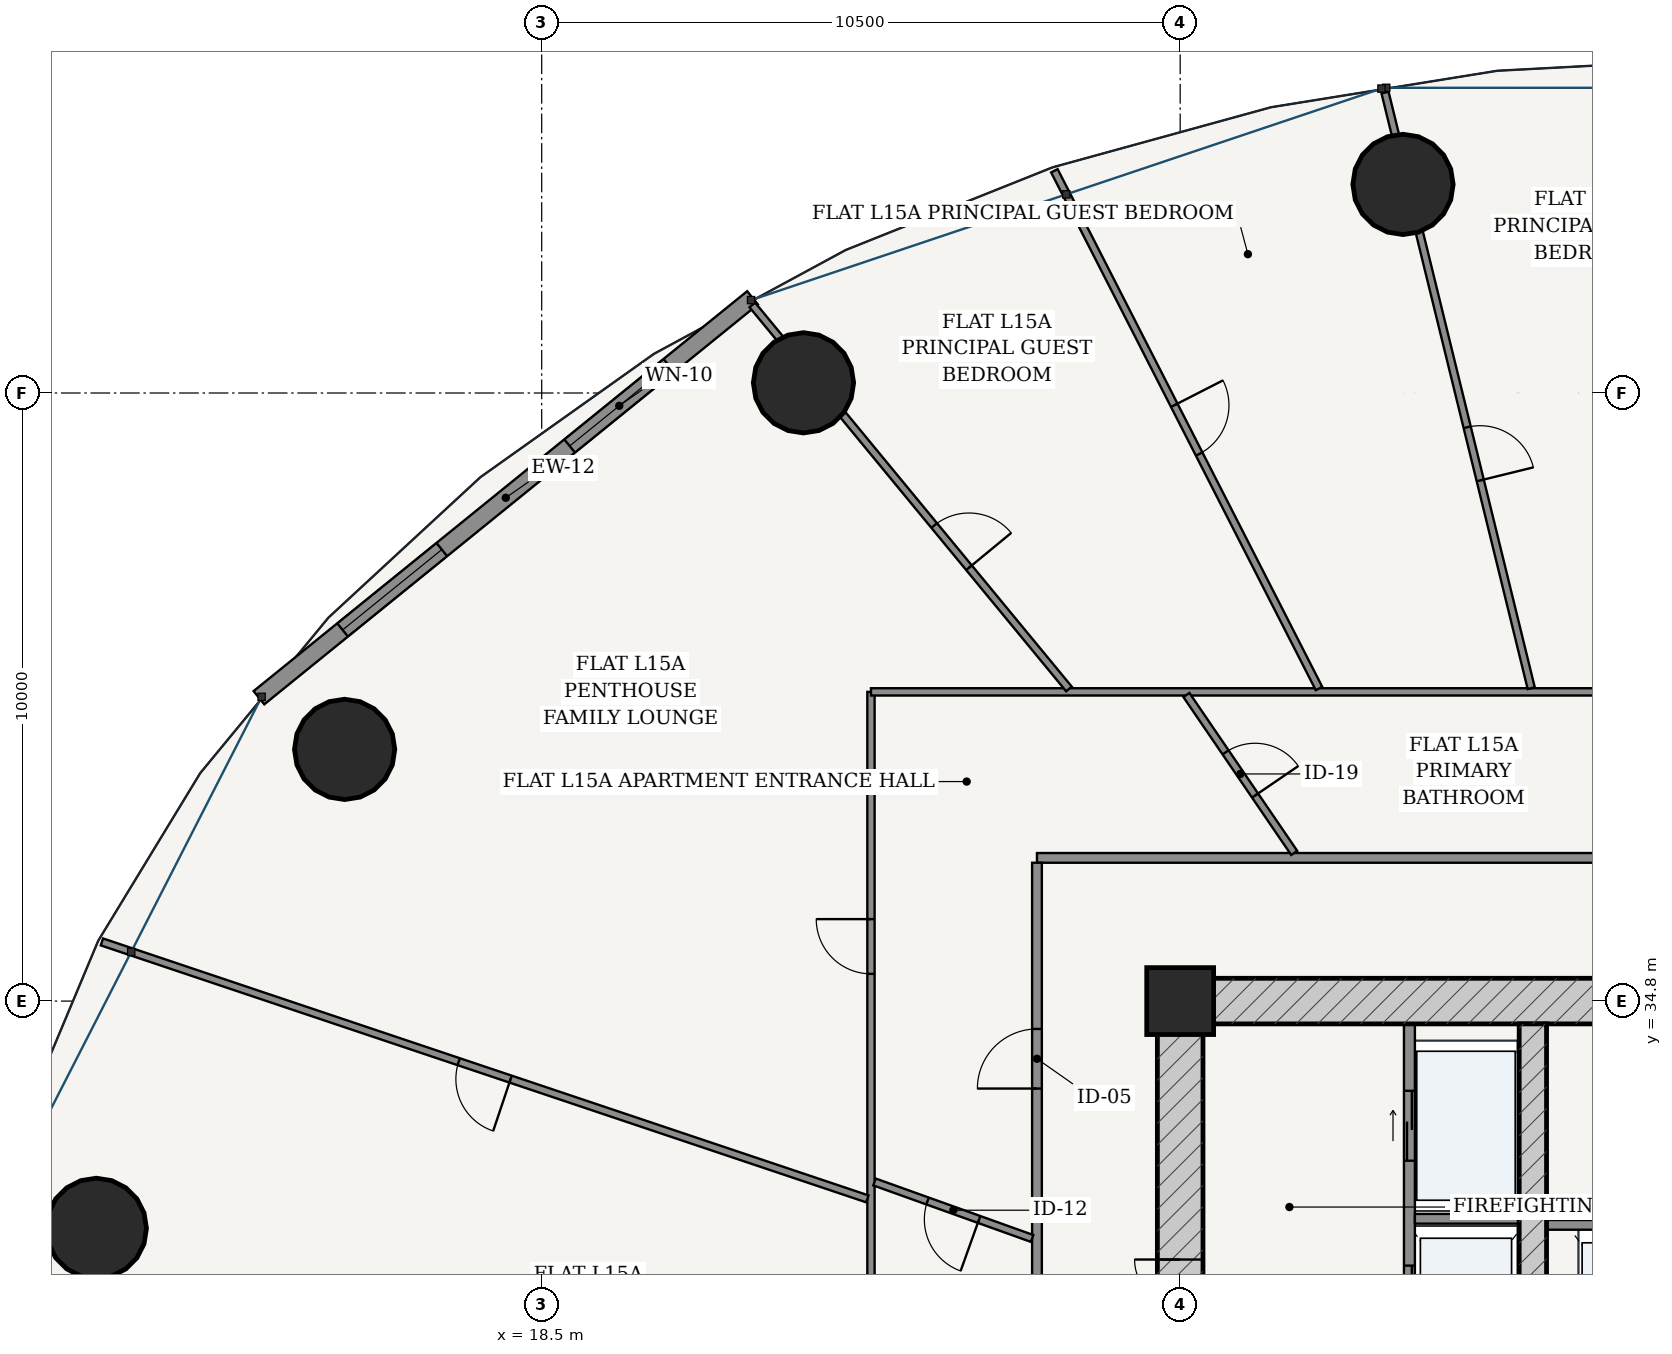
"""IFC4 building model, lengths in metres.
Left out: names, types, materials, properties, quantities, classifications, styles, units other than length and angle.
Written with IfcOpenShell. Run it as: python <this file> out.ifc"""

import sys

from ifc_helpers import new_model, si_unit, direction, frame, frame_2d, origin, origin_2d, place, context, subcontext, project, spatial, rectangle, hollow_circle, extrude, source, transform, mapped, element, fill, save


model = new_model("IFC4")
c1 = context("Model", 3, precision=1e-05, world=origin(), true_north=direction((-0.2419218956, 0.970295726276)))
c2 = subcontext(c1, "Body", "Model", "MODEL_VIEW")
j1 = project(units=[si_unit("LENGTHUNIT", "METRE"), si_unit("PLANEANGLEUNIT", "RADIAN")], contexts=[c1])
p1 = place(None, origin())
s1 = spatial("IfcSite", under=j1, at=p1, CompositionType="ELEMENT")
p2 = place(p1, origin())
s2 = spatial("IfcBuilding", under=s1, at=p2, CompositionType="ELEMENT")
p3 = place(p2, frame((0.0, 0.0, 60.0)))
s3 = spatial("IfcBuildingStorey", under=s2, at=p3, CompositionType="ELEMENT", Elevation=60.0)
p4 = place(p3, frame((29.0, 34.8, 0.0), z_axis=(0.0, 0.0, 1.0), x_axis=(1.0, 0.0, 0.0)))
e1 = element("IfcColumn", 1, at=p4, inside=s3, PredefinedType="COLUMN", context=c2, shape_type="SweptSolid", body=[
    extrude(rectangle(XDim=1.1, YDim=1.1, at=origin_2d()), origin(), (0.0, 0.0, 1.0), 3.6),
])
p5 = place(p3, frame((28.625, 34.8, 0.0), z_axis=(0.0, 0.0, 1.0), x_axis=(1.0, 0.0, 0.0)))
e2 = element("IfcWall", 2, at=p5, inside=s3, PredefinedType="SHEAR", context=c2, shape_type="SweptSolid", body=[
    extrude(rectangle(XDim=18.75, YDim=0.75, at=frame_2d((9.375, 0.0))), origin(), (0.0, 0.0, 1.0), 3.32),
])
p6 = place(p5, frame((8.95, 0.0, 0.0)))
e3 = element("IfcOpeningElement", 3, at=p6, cuts=e2, PredefinedType="OPENING", context=c2, shape_type="SweptSolid", body=[
    extrude(rectangle(XDim=0.85, YDim=2.1, at=frame_2d((0.425, 1.05))), frame((0.0, 0.385, 0.0), z_axis=(0.0, -1.0, 0.0), x_axis=(1.0, 0.0, 0.0)), (0.0, 0.0, 1.0), 0.77),
])
p7 = place(p3, frame((29.0, 19.175, 0.0), z_axis=(0.0, 0.0, 1.0), x_axis=(0.0, 1.0, 0.0)))
e4 = element("IfcWall", 4, at=p7, inside=s3, PredefinedType="SHEAR", context=c2, shape_type="SweptSolid", body=[
    extrude(rectangle(XDim=15.25, YDim=0.75, at=frame_2d((7.625, 0.0))), origin(), (0.0, 0.0, 1.0), 3.32),
])
p8 = place(p7, frame((9.875, 0.0, 0.0)))
e5 = element("IfcOpeningElement", 5, at=p8, cuts=e4, PredefinedType="OPENING", context=c2, shape_type="SweptSolid", body=[
    extrude(rectangle(XDim=1.5, YDim=2.2, at=frame_2d((0.75, 1.1))), frame((0.0, 0.385, 0.0), z_axis=(0.0, -1.0, 0.0), x_axis=(1.0, 0.0, 0.0)), (0.0, 0.0, 1.0), 0.77),
])
p9 = place(p3, frame((34.8, 19.175, 0.0), z_axis=(0.0, 0.0, 1.0), x_axis=(0.0, 1.0, 0.0)))
e6 = element("IfcWall", 6, at=p9, inside=s3, PredefinedType="SHEAR", context=c2, shape_type="SweptSolid", body=[
    extrude(rectangle(XDim=15.25, YDim=0.45, at=frame_2d((7.625, 0.0))), origin(), (0.0, 0.0, 1.0), 3.32),
])
p10 = place(p9, frame((7.8, 0.0, 0.0)))
e7 = element("IfcOpeningElement", 7, at=p10, cuts=e6, PredefinedType="OPENING", context=c2, shape_type="SweptSolid", body=[
    extrude(rectangle(XDim=1.05, YDim=2.15, at=frame_2d((0.525, 1.075))), frame((0.0, 0.235, 0.0), z_axis=(0.0, -1.0, 0.0), x_axis=(1.0, 0.0, 0.0)), (0.0, 0.0, 1.0), 0.47),
])
for number, where, z_axis, x_axis in (
    (8, (32.664, 48.23, 0.0), (0.0, 0.0, 1.0), (1.0, 0.0, 0.0)),
    (9, (22.805, 44.968, 0.0), (0.0, 0.0, 1.0), (1.0, 0.0, 0.0)),
    (10, (15.259, 38.939, 0.0), (0.0, 0.0, 1.0), (1.0, 0.0, 0.0)),
    (11, (11.176, 31.063, 0.0), (0.0, 0.0, 1.0), (1.0, 0.0, 0.0)),
):
    element("IfcColumn", number, at=place(p3, frame(where, z_axis=z_axis, x_axis=x_axis)), inside=s3, PredefinedType="COLUMN", context=c2, shape_type="SweptSolid", body=[
        extrude(hollow_circle(Radius=0.825, WallThickness=0.05, at=origin_2d()), origin(), (0.0, 0.0, 1.0), 3.6),
    ])
p11 = place(p3, frame((21.967, 46.365, 0.0), z_axis=(0.0, 0.0, 1.0), x_axis=(-0.777005352078, -0.62949398952, 0.0)))
e12 = element("IfcWall", 12, at=p11, inside=s3, PredefinedType="SOLIDWALL", context=c2, shape_type="SweptSolid", body=[
    extrude(rectangle(XDim=10.447, YDim=0.28, at=frame_2d((5.223, 0.0))), origin(), (0.0, 0.0, 1.0), 3.32),
])
p12 = place(p11, frame((1.771, 0.0, 0.85)))
e13 = element("IfcOpeningElement", 13, at=p12, cuts=e12, PredefinedType="OPENING", context=c2, shape_type="SweptSolid", body=[
    extrude(rectangle(XDim=2.1, YDim=1.95, at=frame_2d((1.05, 0.975))), frame((0.0, 0.15, 0.0), z_axis=(0.0, -1.0, 0.0), x_axis=(1.0, 0.0, 0.0)), (0.0, 0.0, 1.0), 0.3),
])
p13 = place(p11, frame((6.576, 0.0, 0.85)))
e14 = element("IfcOpeningElement", 14, at=p13, cuts=e12, PredefinedType="OPENING", context=c2, shape_type="SweptSolid", body=[
    extrude(rectangle(XDim=2.1, YDim=1.95, at=frame_2d((1.05, 0.975))), frame((0.0, 0.15, 0.0), z_axis=(0.0, -1.0, 0.0), x_axis=(1.0, 0.0, 0.0)), (0.0, 0.0, 1.0), 0.3),
])
p14 = place(p3, frame((32.77, 28.52, 0.0), z_axis=(0.0, 0.0, 1.0), x_axis=(0.0, 1.0, 0.0)))
e15 = element("IfcWall", 15, at=p14, inside=s3, PredefinedType="PARTITIONING", context=c2, shape_type="SweptSolid", body=[
    extrude(rectangle(XDim=5.905, YDim=0.18, at=frame_2d((2.953, 0.0))), origin(), (0.0, 0.0, 1.0), 3.32),
])
p15 = place(p14, frame((3.655, 0.0, 0.0)))
e16 = element("IfcOpeningElement", 16, at=p15, cuts=e15, PredefinedType="OPENING", context=c2, shape_type="SweptSolid", body=[
    extrude(rectangle(XDim=1.15, YDim=2.2, at=frame_2d((0.575, 1.1))), frame((0.0, 0.1, 0.0), z_axis=(0.0, -1.0, 0.0), x_axis=(1.0, 0.0, 0.0)), (0.0, 0.0, 1.0), 0.2),
])
p16 = place(p14, frame((0.73, 0.0, 0.0)))
e17 = element("IfcOpeningElement", 17, at=p16, cuts=e15, PredefinedType="OPENING", context=c2, shape_type="SweptSolid", body=[
    extrude(rectangle(XDim=1.2, YDim=2.25, at=frame_2d((0.6, 1.125))), frame((0.0, 0.1, 0.0), z_axis=(0.0, -1.0, 0.0), x_axis=(1.0, 0.0, 0.0)), (0.0, 0.0, 1.0), 0.2),
])
p17 = place(p3, frame((32.86, 31.22, 0.0), z_axis=(0.0, 0.0, 1.0), x_axis=(1.0, 0.0, 0.0)))
e18 = element("IfcWall", 18, at=p17, inside=s3, PredefinedType="PARTITIONING", context=c2, shape_type="SweptSolid", body=[
    extrude(rectangle(XDim=1.715, YDim=0.16, at=frame_2d((0.857, 0.0))), origin(), (0.0, 0.0, 1.0), 3.32),
])
p18 = place(p3, frame((35.025, 31.12, 0.0), z_axis=(0.0, 0.0, 1.0), x_axis=(1.0, 0.0, 0.0)))
e19 = element("IfcWall", 19, at=p18, inside=s3, PredefinedType="PARTITIONING", context=c2, shape_type="SweptSolid", body=[
    extrude(rectangle(XDim=5.95, YDim=0.16, at=frame_2d((2.975, 0.0))), origin(), (0.0, 0.0, 1.0), 3.32),
])
p19 = place(p3, frame((26.645, 37.155, 0.0), z_axis=(0.0, 0.0, 1.0), x_axis=(1.0, 0.0, 0.0)))
e20 = element("IfcWall", 20, at=p19, inside=s3, PredefinedType="PARTITIONING", context=c2, shape_type="SweptSolid", body=[
    extrude(rectangle(XDim=22.71, YDim=0.16, at=frame_2d((11.355, 0.0))), origin(), (0.0, 0.0, 1.0), 2.688),
])
p20 = place(p3, frame((26.645, 16.525, 0.0), z_axis=(0.0, 0.0, 1.0), x_axis=(0.0, 1.0, 0.0)))
e21 = element("IfcWall", 21, at=p20, inside=s3, PredefinedType="PARTITIONING", context=c2, shape_type="SweptSolid", body=[
    extrude(rectangle(XDim=20.55, YDim=0.16, at=frame_2d((10.275, 0.0))), origin(), (0.0, 0.0, 1.0), 2.688),
])
p21 = place(p20, frame((16.837, 0.0, 0.0)))
e22 = element("IfcOpeningElement", 22, at=p21, cuts=e21, PredefinedType="OPENING", context=c2, shape_type="SweptSolid", body=[
    extrude(rectangle(XDim=0.98, YDim=2.2, at=frame_2d((0.49, 1.1))), frame((0.0, 0.09, 0.0), z_axis=(0.0, -1.0, 0.0), x_axis=(1.0, 0.0, 0.0)), (0.0, 0.0, 1.0), 0.18),
])
p22 = place(p3, frame((23.915, 19.276, 0.0), z_axis=(0.0, 0.0, 1.0), x_axis=(0.0, 1.0, 0.0)))
e23 = element("IfcWall", 23, at=p22, inside=s3, PredefinedType="PARTITIONING", context=c2, shape_type="SweptSolid", body=[
    extrude(rectangle(XDim=20.609, YDim=0.12, at=frame_2d((10.305, 0.0))), origin(), (0.0, 0.0, 1.0), 2.688),
])
p23 = place(p22, frame((15.972, 0.0, 0.0)))
e24 = element("IfcOpeningElement", 24, at=p23, cuts=e23, PredefinedType="OPENING", context=c2, shape_type="SweptSolid", body=[
    extrude(rectangle(XDim=0.9, YDim=2.15, at=frame_2d((0.45, 1.075))), frame((0.0, 0.07, 0.0), z_axis=(0.0, -1.0, 0.0), x_axis=(1.0, 0.0, 0.0)), (0.0, 0.0, 1.0), 0.14),
])
p24 = place(p22, frame((3.058, 0.0, 0.0)))
e25 = element("IfcOpeningElement", 25, at=p24, cuts=e23, PredefinedType="OPENING", context=c2, shape_type="SweptSolid", body=[
    extrude(rectangle(XDim=0.9, YDim=2.15, at=frame_2d((0.45, 1.075))), frame((0.0, 0.07, 0.0), z_axis=(0.0, -1.0, 0.0), x_axis=(1.0, 0.0, 0.0)), (0.0, 0.0, 1.0), 0.14),
])
p25 = place(p3, frame((23.915, 39.885, 0.0), z_axis=(0.0, 0.0, 1.0), x_axis=(1.0, 0.0, 0.0)))
e26 = element("IfcWall", 26, at=p25, inside=s3, PredefinedType="PARTITIONING", context=c2, shape_type="SweptSolid", body=[
    extrude(rectangle(XDim=28.17, YDim=0.12, at=frame_2d((14.085, 0.0))), origin(), (0.0, 0.0, 1.0), 2.688),
])
p26 = place(p25, frame((12.891, 0.0, 0.0)))
e27 = element("IfcOpeningElement", 27, at=p26, cuts=e26, PredefinedType="OPENING", context=c2, shape_type="SweptSolid", body=[
    extrude(rectangle(XDim=0.9, YDim=2.15, at=frame_2d((0.45, 1.075))), frame((0.0, 0.07, 0.0), z_axis=(0.0, -1.0, 0.0), x_axis=(1.0, 0.0, 0.0)), (0.0, 0.0, 1.0), 0.14),
])
p27 = place(p3, frame((34.773, 39.945, 0.0), z_axis=(0.0, 0.0, 1.0), x_axis=(-0.238375747469, 0.97117300365, 0.0)))
e28 = element("IfcWall", 28, at=p27, inside=s3, PredefinedType="PARTITIONING", context=c2, shape_type="SweptSolid", body=[
    extrude(rectangle(XDim=10.086, YDim=0.12, at=frame_2d((5.043, 0.0))), origin(), (0.0, 0.0, 1.0), 2.688),
])
p28 = place(p27, frame((3.519, 0.0, 0.0)))
e29 = element("IfcOpeningElement", 29, at=p28, cuts=e28, PredefinedType="OPENING", context=c2, shape_type="SweptSolid", body=[
    extrude(rectangle(XDim=0.9, YDim=2.15, at=frame_2d((0.45, 1.075))), frame((0.0, 0.07, 0.0), z_axis=(0.0, -1.0, 0.0), x_axis=(1.0, 0.0, 0.0)), (0.0, 0.0, 1.0), 0.14),
])
p29 = place(p3, frame((31.283, 39.94, 0.0), z_axis=(0.0, 0.0, 1.0), x_axis=(-0.455131303234, 0.890424335256, 0.0)))
e30 = element("IfcWall", 30, at=p29, inside=s3, PredefinedType="PARTITIONING", context=c2, shape_type="SweptSolid", body=[
    extrude(rectangle(XDim=9.562, YDim=0.12, at=frame_2d((4.781, 0.0))), origin(), (0.0, 0.0, 1.0), 2.762),
])
p30 = place(p29, frame((4.331, 0.0, 0.0)))
e31 = element("IfcOpeningElement", 31, at=p30, cuts=e30, PredefinedType="OPENING", context=c2, shape_type="SweptSolid", body=[
    extrude(rectangle(XDim=0.9, YDim=2.15, at=frame_2d((0.45, 1.075))), frame((0.0, 0.07, 0.0), z_axis=(0.0, -1.0, 0.0), x_axis=(1.0, 0.0, 0.0)), (0.0, 0.0, 1.0), 0.14),
])
p31 = place(p3, frame((27.171, 39.933, 0.0), z_axis=(0.0, 0.0, 1.0), x_axis=(-0.636192172227, 0.771530634516, 0.0)))
e32 = element("IfcWall", 32, at=p31, inside=s3, PredefinedType="PARTITIONING", context=c2, shape_type="SweptSolid", body=[
    extrude(rectangle(XDim=8.186, YDim=0.12, at=frame_2d((4.093, 0.0))), origin(), (0.0, 0.0, 1.0), 2.688),
])
p32 = place(p31, frame((2.584, 0.0, 0.0)))
e33 = element("IfcOpeningElement", 33, at=p32, cuts=e32, PredefinedType="OPENING", context=c2, shape_type="SweptSolid", body=[
    extrude(rectangle(XDim=0.9, YDim=2.15, at=frame_2d((0.45, 1.075))), frame((0.0, 0.07, 0.0), z_axis=(0.0, -1.0, 0.0), x_axis=(1.0, 0.0, 0.0)), (0.0, 0.0, 1.0), 0.14),
])
p33 = place(p3, frame((23.856, 31.547, 0.0), z_axis=(0.0, 0.0, 1.0), x_axis=(-0.948017487737, 0.318218231634, 0.0)))
e34 = element("IfcWall", 34, at=p33, inside=s3, PredefinedType="PARTITIONING", context=c2, shape_type="SweptSolid", body=[
    extrude(rectangle(XDim=13.279, YDim=0.12, at=frame_2d((6.639, 0.0))), origin(), (0.0, 0.0, 1.0), 2.762),
])
p34 = place(p33, frame((6.189, 0.0, 0.0)))
e35 = element("IfcOpeningElement", 35, at=p34, cuts=e34, PredefinedType="OPENING", context=c2, shape_type="SweptSolid", body=[
    extrude(rectangle(XDim=0.9, YDim=2.15, at=frame_2d((0.45, 1.075))), frame((0.0, 0.07, 0.0), z_axis=(0.0, -1.0, 0.0), x_axis=(1.0, 0.0, 0.0)), (0.0, 0.0, 1.0), 0.14),
])
p35 = place(p3, frame((30.875, 37.237, 0.0), z_axis=(0.0, 0.0, 1.0), x_axis=(-0.563751131022, 0.825944708967, 0.0)))
e36 = element("IfcWall", 36, at=p35, inside=s3, PredefinedType="PARTITIONING", context=c2, shape_type="SweptSolid", body=[
    extrude(rectangle(XDim=3.145, YDim=0.12, at=frame_2d((1.572, 0.0))), origin(), (0.0, 0.0, 1.0), 3.32),
])
p36 = place(p35, frame((1.142, 0.0, 0.0)))
e37 = element("IfcOpeningElement", 37, at=p36, cuts=e36, PredefinedType="OPENING", context=c2, shape_type="SweptSolid", body=[
    extrude(rectangle(XDim=0.86, YDim=2.15, at=frame_2d((0.43, 1.075))), frame((0.0, 0.07, 0.0), z_axis=(0.0, -1.0, 0.0), x_axis=(1.0, 0.0, 0.0)), (0.0, 0.0, 1.0), 0.14),
])
p37 = place(p3, frame((26.565, 30.896, 0.0), z_axis=(0.0, 0.0, 1.0), x_axis=(-0.941406362049, 0.337274460186, 0.0)))
e38 = element("IfcWall", 38, at=p37, inside=s3, PredefinedType="PARTITIONING", context=c2, shape_type="SweptSolid", body=[
    extrude(rectangle(XDim=2.753, YDim=0.12, at=frame_2d((1.376, 0.0))), origin(), (0.0, 0.0, 1.0), 3.32),
])
p38 = place(p37, frame((0.927, 0.0, 0.0)))
e39 = element("IfcOpeningElement", 39, at=p38, cuts=e38, PredefinedType="OPENING", context=c2, shape_type="SweptSolid", body=[
    extrude(rectangle(XDim=0.9, YDim=2.15, at=frame_2d((0.45, 1.075))), frame((0.0, 0.07, 0.0), z_axis=(0.0, -1.0, 0.0), x_axis=(1.0, 0.0, 0.0)), (0.0, 0.0, 1.0), 0.14),
])
m1 = source(origin(), c2, "Body", "SweptSolid", [
    extrude(rectangle(XDim=2.1, YDim=1.95, at=frame_2d((1.05, 0.975))), frame((0.0, 0.03, 0.0), z_axis=(0.0, -1.0, 0.0), x_axis=(1.0, 0.0, 0.0)), (0.0, 0.0, 1.0), 0.06),
])
p39 = place(p12, origin())
e40 = element("IfcWindow", 40, at=p39, inside=s3, PartitioningType="SINGLE_PANEL", PredefinedType="WINDOW", context=c2, shape_type="MappedRepresentation", body=[
    mapped(m1, transform((0.0, 0.0, 0.0), scale=1.0)),
])
fill(e13, e40)
p40 = place(p13, origin())
e41 = element("IfcWindow", 41, at=p40, inside=s3, PartitioningType="SINGLE_PANEL", PredefinedType="WINDOW", context=c2, shape_type="MappedRepresentation", body=[
    mapped(m1, transform((0.0, 0.0, 0.0), scale=1.0)),
])
fill(e14, e41)
m2 = source(origin(), c2, "Body", "SweptSolid", [
    extrude(rectangle(XDim=1.5, YDim=2.2, at=frame_2d((0.75, 1.1))), frame((0.0, 0.025, 0.0), z_axis=(0.0, -1.0, 0.0), x_axis=(1.0, 0.0, 0.0)), (0.0, 0.0, 1.0), 0.05),
])
p41 = place(p8, origin())
e42 = element("IfcDoor", 42, at=p41, inside=s3, OperationType="DOUBLE_DOOR_SINGLE_SWING", PredefinedType="DOOR", context=c2, shape_type="MappedRepresentation", body=[
    mapped(m2, transform((0.0, 0.0, 0.0), scale=1.0)),
])
fill(e5, e42)
m3 = source(origin(), c2, "Body", "SweptSolid", [
    extrude(rectangle(XDim=1.15, YDim=2.2, at=frame_2d((0.575, 1.1))), frame((0.0, 0.025, 0.0), z_axis=(0.0, -1.0, 0.0), x_axis=(1.0, 0.0, 0.0)), (0.0, 0.0, 1.0), 0.05),
])
p42 = place(p15, origin())
e43 = element("IfcDoor", 43, at=p42, inside=s3, OperationType="DOUBLE_DOOR_SLIDING", PredefinedType="DOOR", context=c2, shape_type="MappedRepresentation", body=[
    mapped(m3, transform((0.0, 0.0, 0.0), scale=1.0)),
])
fill(e16, e43)
m4 = source(origin(), c2, "Body", "SweptSolid", [
    extrude(rectangle(XDim=1.2, YDim=2.25, at=frame_2d((0.6, 1.125))), frame((0.0, 0.025, 0.0), z_axis=(0.0, -1.0, 0.0), x_axis=(1.0, 0.0, 0.0)), (0.0, 0.0, 1.0), 0.05),
])
p43 = place(p16, origin())
e44 = element("IfcDoor", 44, at=p43, inside=s3, OperationType="DOUBLE_DOOR_SLIDING", PredefinedType="DOOR", context=c2, shape_type="MappedRepresentation", body=[
    mapped(m4, transform((0.0, 0.0, 0.0), scale=1.0)),
])
fill(e17, e44)
m5 = source(origin(), c2, "Body", "SweptSolid", [
    extrude(rectangle(XDim=0.98, YDim=2.2, at=frame_2d((0.49, 1.1))), frame((0.0, 0.025, 0.0), z_axis=(0.0, -1.0, 0.0), x_axis=(1.0, 0.0, 0.0)), (0.0, 0.0, 1.0), 0.05),
])
p44 = place(p21, origin())
e45 = element("IfcDoor", 45, at=p44, inside=s3, OperationType="SINGLE_SWING_LEFT", PredefinedType="DOOR", context=c2, shape_type="MappedRepresentation", body=[
    mapped(m5, transform((0.0, 0.0, 0.0), scale=1.0)),
])
fill(e22, e45)
m6 = source(origin(), c2, "Body", "SweptSolid", [
    extrude(rectangle(XDim=0.86, YDim=2.15, at=frame_2d((0.43, 1.075))), frame((0.0, 0.025, 0.0), z_axis=(0.0, -1.0, 0.0), x_axis=(1.0, 0.0, 0.0)), (0.0, 0.0, 1.0), 0.05),
])
p45 = place(p36, frame((0.86, 0.0, 0.0), z_axis=(0.0, 0.0, 1.0), x_axis=(-1.0, 0.0, 0.0)))
e46 = element("IfcDoor", 46, at=p45, inside=s3, OperationType="SINGLE_SWING_RIGHT", PredefinedType="DOOR", context=c2, shape_type="MappedRepresentation", body=[
    mapped(m6, transform((0.0, 0.0, 0.0), scale=1.0)),
])
fill(e37, e46)
m7 = source(origin(), c2, "Body", "SweptSolid", [
    extrude(rectangle(XDim=0.9, YDim=2.15, at=frame_2d((0.45, 1.075))), frame((0.0, 0.025, 0.0), z_axis=(0.0, -1.0, 0.0), x_axis=(1.0, 0.0, 0.0)), (0.0, 0.0, 1.0), 0.05),
])
p46 = place(p38, origin())
e47 = element("IfcDoor", 47, at=p46, inside=s3, OperationType="SINGLE_SWING_LEFT", PredefinedType="DOOR", context=c2, shape_type="MappedRepresentation", body=[
    mapped(m7, transform((0.0, 0.0, 0.0), scale=1.0)),
])
fill(e39, e47)
p47 = place(p23, origin())
e48 = element("IfcDoor", 48, at=p47, inside=s3, OperationType="SINGLE_SWING_RIGHT", PredefinedType="DOOR", context=c2, shape_type="MappedRepresentation", body=[
    mapped(m7, transform((0.0, 0.0, 0.0), scale=1.0)),
])
fill(e24, e48)
p48 = place(p34, origin())
e49 = element("IfcDoor", 49, at=p48, inside=s3, OperationType="SINGLE_SWING_LEFT", PredefinedType="DOOR", context=c2, shape_type="MappedRepresentation", body=[
    mapped(m7, transform((0.0, 0.0, 0.0), scale=1.0)),
])
fill(e35, e49)
p49 = place(p32, frame((0.9, 0.0, 0.0), z_axis=(0.0, 0.0, 1.0), x_axis=(-1.0, 0.0, 0.0)))
e50 = element("IfcDoor", 50, at=p49, inside=s3, OperationType="SINGLE_SWING_RIGHT", PredefinedType="DOOR", context=c2, shape_type="MappedRepresentation", body=[
    mapped(m7, transform((0.0, 0.0, 0.0), scale=1.0)),
])
fill(e33, e50)
p50 = place(p30, frame((0.9, 0.0, 0.0), z_axis=(0.0, 0.0, 1.0), x_axis=(-1.0, 0.0, 0.0)))
e51 = element("IfcDoor", 51, at=p50, inside=s3, OperationType="SINGLE_SWING_LEFT", PredefinedType="DOOR", context=c2, shape_type="MappedRepresentation", body=[
    mapped(m7, transform((0.0, 0.0, 0.0), scale=1.0)),
])
fill(e31, e51)
p51 = place(p28, frame((0.9, 0.0, 0.0), z_axis=(0.0, 0.0, 1.0), x_axis=(-1.0, 0.0, 0.0)))
e52 = element("IfcDoor", 52, at=p51, inside=s3, OperationType="SINGLE_SWING_RIGHT", PredefinedType="DOOR", context=c2, shape_type="MappedRepresentation", body=[
    mapped(m7, transform((0.0, 0.0, 0.0), scale=1.0)),
])
fill(e29, e52)
save(model, sys.argv[1])
